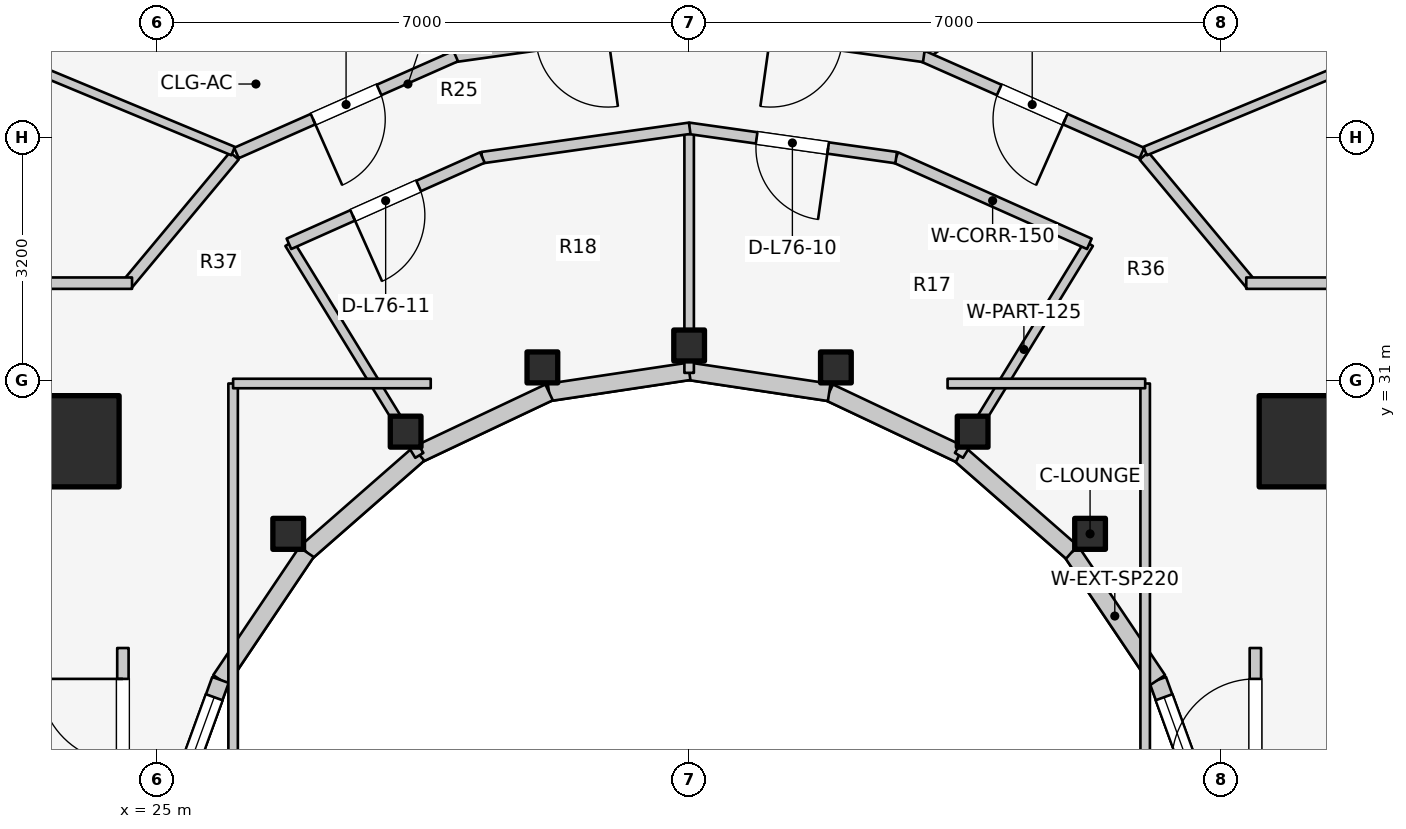
"""IFC4 building model, lengths in metres.
Left out: names, types, materials, properties, quantities, classifications, styles, units other than length and angle.
Written with IfcOpenShell. Run it as: python <this file> out.ifc"""

import sys

from ifc_helpers import new_model, si_unit, direction, frame, frame_2d, origin, origin_2d, place, context, subcontext, project, spatial, rectangle, i_section, extrude, element, fill, save


model = new_model("IFC4")
c1 = context("Model", 3, precision=1e-05, world=origin(), true_north=direction((0.0, 1.0)))
c2 = subcontext(c1, "Body", "Model", "MODEL_VIEW")
j1 = project(units=[si_unit("LENGTHUNIT", "METRE"), si_unit("PLANEANGLEUNIT", "RADIAN")], contexts=[c1])
p1 = place(None, origin())
s1 = spatial("IfcSite", under=j1, at=p1, CompositionType="ELEMENT")
p2 = place(p1, origin())
s2 = spatial("IfcBuilding", under=s1, at=p2, CompositionType="ELEMENT")
p3 = place(p2, frame((0.0, 0.0, 249.6)))
s3 = spatial("IfcBuildingStorey", under=s2, at=p3, CompositionType="ELEMENT", Elevation=249.6)
for number, where, z_axis, x_axis in (
    (1, (19.65, 30.35, 0.0), (0.0, 0.0, 1.0), (1.0, 0.0, 0.0)),
    (2, (39.85, 30.35, 0.0), (0.0, 0.0, 1.0), (1.0, 0.0, 0.0)),
):
    element("IfcWall", number, at=place(p3, frame(where, z_axis=z_axis, x_axis=x_axis)), inside=s3, PredefinedType="SHEAR", context=c2, shape_type="SweptSolid", body=[
        extrude(rectangle(XDim=4.5, YDim=0.45, at=frame_2d((2.25, 0.0))), origin(), (0.0, 0.0, 1.0), 3.6),
    ])
for number, where, z_axis, x_axis in (
    (3, (23.9, 30.2, 0.0), (0.0, 0.0, 1.0), (1.0, 0.0, 0.0)),
    (4, (40.1, 30.2, 0.0), (0.0, 0.0, 1.0), (1.0, 0.0, 0.0)),
):
    element("IfcColumn", number, at=place(p3, frame(where, z_axis=z_axis, x_axis=x_axis)), inside=s3, PredefinedType="COLUMN", context=c2, shape_type="SweptSolid", body=[
        extrude(rectangle(XDim=1.2, YDim=1.2, at=origin_2d()), origin(), (0.0, 0.0, 1.0), 3.6),
    ])
for number, where, z_axis, x_axis in (
    (5, (37.275, 28.982, 0.0), (0.0, 0.0, 1.0), (1.0, 0.0, 0.0)),
    (6, (35.73, 30.327, 0.0), (0.0, 0.0, 1.0), (1.0, 0.0, 0.0)),
    (7, (33.931, 31.172, 0.0), (0.0, 0.0, 1.0), (1.0, 0.0, 0.0)),
    (8, (32.0, 31.46, 0.0), (0.0, 0.0, 1.0), (1.0, 0.0, 0.0)),
    (9, (30.069, 31.172, 0.0), (0.0, 0.0, 1.0), (1.0, 0.0, 0.0)),
    (10, (28.27, 30.327, 0.0), (0.0, 0.0, 1.0), (1.0, 0.0, 0.0)),
    (11, (26.725, 28.982, 0.0), (0.0, 0.0, 1.0), (1.0, 0.0, 0.0)),
):
    element("IfcColumn", number, at=place(p3, frame(where, z_axis=z_axis, x_axis=x_axis)), inside=s3, PredefinedType="COLUMN", context=c2, shape_type="SweptSolid", body=[
        extrude(i_section(OverallWidth=0.404, OverallDepth=0.407, WebThickness=0.027, FlangeThickness=0.044, FilletRadius=0.025, at=origin_2d()), origin(), (0.0, 0.0, 1.0), 3.6),
    ])
p4 = place(p3, frame((38.877, 25.102, 0.0), z_axis=(0.0, 0.0, 1.0), x_axis=(-0.341423187295, 0.93990968033, 0.0)))
e12 = element("IfcWall", 12, at=p4, inside=s3, PredefinedType="STANDARD", context=c2, shape_type="SweptSolid", body=[
    extrude(rectangle(XDim=2.084, YDim=0.23, at=frame_2d((1.042, 0.0))), origin(), (0.0, 0.0, 1.0), 3.28),
])
p5 = place(p4, frame((0.242, 0.0, 0.85)))
e13 = element("IfcOpeningElement", 13, at=p5, cuts=e12, PredefinedType="OPENING", context=c2, shape_type="SweptSolid", body=[
    extrude(rectangle(XDim=1.6, YDim=1.65, at=frame_2d((0.8, 0.825))), frame((0.0, 0.125, 0.0), z_axis=(0.0, -1.0, 0.0), x_axis=(1.0, 0.0, 0.0)), (0.0, 0.0, 1.0), 0.25),
])
p6 = place(p3, frame((38.166, 27.06, 0.0), z_axis=(0.0, 0.0, 1.0), x_axis=(-0.558197800898, 0.829707909492, 0.0)))
e14 = element("IfcWall", 14, at=p6, inside=s3, PredefinedType="STANDARD", context=c2, shape_type="SweptSolid", body=[
    extrude(rectangle(XDim=2.027, YDim=0.23, at=frame_2d((1.013, 0.0))), origin(), (0.0, 0.0, 1.0), 2.6),
])
p7 = place(p3, frame((37.035, 28.742, 0.0), z_axis=(0.0, 0.0, 1.0), x_axis=(-0.752576694707, 0.658504607869, 0.0)))
e15 = element("IfcWall", 15, at=p7, inside=s3, PredefinedType="STANDARD", context=c2, shape_type="SweptSolid", body=[
    extrude(rectangle(XDim=1.959, YDim=0.23, at=frame_2d((0.98, 0.0))), origin(), (0.0, 0.0, 1.0), 2.6),
])
p8 = place(p3, frame((35.56, 30.032, 0.0), z_axis=(0.0, 0.0, 1.0), x_axis=(-0.904179699603, 0.427152280606, 0.0)))
e16 = element("IfcWall", 16, at=p8, inside=s3, PredefinedType="STANDARD", context=c2, shape_type="SweptSolid", body=[
    extrude(rectangle(XDim=1.899, YDim=0.23, at=frame_2d((0.95, 0.0))), origin(), (0.0, 0.0, 1.0), 2.6),
])
for number, where, z_axis, x_axis in (
    (17, (33.843, 30.843, 0.0), (0.0, 0.0, 1.0), (-0.989, 0.149, 0.0)),
    (18, (32.0, 31.12, 0.0), (0.0, 0.0, 1.0), (-0.989, -0.149, 0.0)),
):
    element("IfcWall", number, at=place(p3, frame(where, z_axis=z_axis, x_axis=x_axis)), inside=s3, PredefinedType="STANDARD", context=c2, shape_type="SweptSolid", body=[
        extrude(rectangle(XDim=1.864, YDim=0.23, at=frame_2d((0.932, 0.0))), origin(), (0.0, 0.0, 1.0), 2.6),
    ])
p9 = place(p3, frame((30.157, 30.843, 0.0), z_axis=(0.0, 0.0, 1.0), x_axis=(-0.904179699603, -0.427152280606, 0.0)))
e19 = element("IfcWall", 19, at=p9, inside=s3, PredefinedType="STANDARD", context=c2, shape_type="SweptSolid", body=[
    extrude(rectangle(XDim=1.899, YDim=0.23, at=frame_2d((0.95, 0.0))), origin(), (0.0, 0.0, 1.0), 2.6),
])
p10 = place(p3, frame((28.44, 30.032, 0.0), z_axis=(0.0, 0.0, 1.0), x_axis=(-0.752576694707, -0.658504607869, 0.0)))
e20 = element("IfcWall", 20, at=p10, inside=s3, PredefinedType="STANDARD", context=c2, shape_type="SweptSolid", body=[
    extrude(rectangle(XDim=1.959, YDim=0.23, at=frame_2d((0.98, 0.0))), origin(), (0.0, 0.0, 1.0), 2.6),
])
p11 = place(p3, frame((26.965, 28.742, 0.0), z_axis=(0.0, 0.0, 1.0), x_axis=(-0.558197800898, -0.829707909492, 0.0)))
e21 = element("IfcWall", 21, at=p11, inside=s3, PredefinedType="STANDARD", context=c2, shape_type="SweptSolid", body=[
    extrude(rectangle(XDim=2.027, YDim=0.23, at=frame_2d((1.013, 0.0))), origin(), (0.0, 0.0, 1.0), 2.6),
])
p12 = place(p3, frame((25.834, 27.06, 0.0), z_axis=(0.0, 0.0, 1.0), x_axis=(-0.341423187295, -0.93990968033, 0.0)))
e22 = element("IfcWall", 22, at=p12, inside=s3, PredefinedType="STANDARD", context=c2, shape_type="SweptSolid", body=[
    extrude(rectangle(XDim=2.084, YDim=0.23, at=frame_2d((1.042, 0.0))), origin(), (0.0, 0.0, 1.0), 3.28),
])
p13 = place(p12, frame((0.242, 0.0, 0.85)))
e23 = element("IfcOpeningElement", 23, at=p13, cuts=e22, PredefinedType="OPENING", context=c2, shape_type="SweptSolid", body=[
    extrude(rectangle(XDim=1.6, YDim=1.65, at=frame_2d((0.8, 0.825))), frame((0.0, 0.125, 0.0), z_axis=(0.0, -1.0, 0.0), x_axis=(1.0, 0.0, 0.0)), (0.0, 0.0, 1.0), 0.25),
])
p14 = place(p3, frame((24.55, 24.08, 0.0), z_axis=(0.0, 0.0, 1.0), x_axis=(0.0, 1.0, 0.0)))
e24 = element("IfcWall", 24, at=p14, inside=s3, PredefinedType="PARTITIONING", context=c2, shape_type="SweptSolid", body=[
    extrude(rectangle(XDim=3.4, YDim=0.15, at=frame_2d((1.7, 0.0))), origin(), (0.0, 0.0, 1.0), 3.295),
])
p15 = place(p14, frame((1.894, 0.0, 0.0)))
e25 = element("IfcOpeningElement", 25, at=p15, cuts=e24, PredefinedType="OPENING", context=c2, shape_type="SweptSolid", body=[
    extrude(rectangle(XDim=1.1, YDim=2.1, at=frame_2d((0.55, 1.05))), frame((0.0, 0.085, 0.0), z_axis=(0.0, -1.0, 0.0), x_axis=(1.0, 0.0, 0.0)), (0.0, 0.0, 1.0), 0.17),
])
p16 = place(p3, frame((39.45, 24.08, 0.0), z_axis=(0.0, 0.0, 1.0), x_axis=(0.0, 1.0, 0.0)))
e26 = element("IfcWall", 26, at=p16, inside=s3, PredefinedType="PARTITIONING", context=c2, shape_type="SweptSolid", body=[
    extrude(rectangle(XDim=3.4, YDim=0.15, at=frame_2d((1.7, 0.0))), origin(), (0.0, 0.0, 1.0), 3.295),
])
p17 = place(p16, frame((1.894, 0.0, 0.0)))
e27 = element("IfcOpeningElement", 27, at=p17, cuts=e26, PredefinedType="OPENING", context=c2, shape_type="SweptSolid", body=[
    extrude(rectangle(XDim=1.1, YDim=2.1, at=frame_2d((0.55, 1.05))), frame((0.0, 0.085, 0.0), z_axis=(0.0, -1.0, 0.0), x_axis=(1.0, 0.0, 0.0)), (0.0, 0.0, 1.0), 0.17),
])
p18 = place(p3, frame((35.55, 30.015, 0.0), z_axis=(0.0, 0.0, 1.0), x_axis=(0.522763432117, 0.852477796802, 0.0)))
e28 = element("IfcWall", 28, at=p18, inside=s3, PredefinedType="PARTITIONING", context=c2, shape_type="SweptSolid", body=[
    extrude(rectangle(XDim=3.269, YDim=0.125, at=frame_2d((1.635, 0.0))), origin(), (0.0, 0.0, 1.0), 2.672),
])
p19 = place(p3, frame((32.0, 31.1, 0.0), z_axis=(0.0, 0.0, 1.0), x_axis=(0.0, 1.0, 0.0)))
e29 = element("IfcWall", 29, at=p19, inside=s3, PredefinedType="PARTITIONING", context=c2, shape_type="SweptSolid", body=[
    extrude(rectangle(XDim=3.218, YDim=0.125, at=frame_2d((1.609, 0.0))), origin(), (0.0, 0.0, 1.0), 2.672),
])
p20 = place(p3, frame((28.45, 30.015, 0.0), z_axis=(0.0, 0.0, 1.0), x_axis=(-0.522763432117, 0.852477796802, 0.0)))
e30 = element("IfcWall", 30, at=p20, inside=s3, PredefinedType="PARTITIONING", context=c2, shape_type="SweptSolid", body=[
    extrude(rectangle(XDim=3.269, YDim=0.125, at=frame_2d((1.635, 0.0))), origin(), (0.0, 0.0, 1.0), 2.672),
])
p21 = place(p3, frame((37.265, 32.798, 0.0), z_axis=(0.0, 0.0, 1.0), x_axis=(-0.913254317828, 0.407389924971, 0.0)))
e31 = element("IfcWall", 31, at=p21, inside=s3, PredefinedType="PARTITIONING", context=c2, shape_type="SweptSolid", body=[
    extrude(rectangle(XDim=2.787, YDim=0.15, at=frame_2d((1.393, 0.0))), origin(), (0.0, 0.0, 1.0), 2.823),
])
p22 = place(p3, frame((34.724, 33.932, 0.0), z_axis=(0.0, 0.0, 1.0), x_axis=(-0.990150268487, 0.140008734782, 0.0)))
e32 = element("IfcWall", 32, at=p22, inside=s3, PredefinedType="PARTITIONING", context=c2, shape_type="SweptSolid", body=[
    extrude(rectangle(XDim=2.759, YDim=0.15, at=frame_2d((1.379, 0.0))), origin(), (0.0, 0.0, 1.0), 2.823),
])
p23 = place(p22, frame((0.904, 0.0, 0.0)))
e33 = element("IfcOpeningElement", 33, at=p23, cuts=e32, PredefinedType="OPENING", context=c2, shape_type="SweptSolid", body=[
    extrude(rectangle(XDim=0.95, YDim=2.1, at=frame_2d((0.475, 1.05))), frame((0.0, 0.085, 0.0), z_axis=(0.0, -1.0, 0.0), x_axis=(1.0, 0.0, 0.0)), (0.0, 0.0, 1.0), 0.17),
])
p24 = place(p3, frame((32.007, 34.318, 0.0), z_axis=(0.0, 0.0, 1.0), x_axis=(-0.990150268487, -0.140008734782, 0.0)))
e34 = element("IfcWall", 34, at=p24, inside=s3, PredefinedType="PARTITIONING", context=c2, shape_type="SweptSolid", body=[
    extrude(rectangle(XDim=2.759, YDim=0.15, at=frame_2d((1.379, 0.0))), origin(), (0.0, 0.0, 1.0), 2.823),
])
p25 = place(p3, frame((29.28, 33.933, 0.0), z_axis=(0.0, 0.0, 1.0), x_axis=(-0.913254317828, -0.407389924971, 0.0)))
e35 = element("IfcWall", 35, at=p25, inside=s3, PredefinedType="PARTITIONING", context=c2, shape_type="SweptSolid", body=[
    extrude(rectangle(XDim=2.787, YDim=0.15, at=frame_2d((1.393, 0.0))), origin(), (0.0, 0.0, 1.0), 2.823),
])
p26 = place(p25, frame((0.918, 0.0, 0.0)))
e36 = element("IfcOpeningElement", 36, at=p26, cuts=e35, PredefinedType="OPENING", context=c2, shape_type="SweptSolid", body=[
    extrude(rectangle(XDim=0.95, YDim=2.1, at=frame_2d((0.475, 1.05))), frame((0.0, 0.085, 0.0), z_axis=(0.0, -1.0, 0.0), x_axis=(1.0, 0.0, 0.0)), (0.0, 0.0, 1.0), 0.17),
])
p27 = place(p3, frame((26.0, 25.8, 0.0), z_axis=(0.0, 0.0, 1.0), x_axis=(0.0, 1.0, 0.0)))
e37 = element("IfcWall", 37, at=p27, inside=s3, PredefinedType="PARTITIONING", context=c2, shape_type="SweptSolid", body=[
    extrude(rectangle(XDim=5.16, YDim=0.125, at=frame_2d((2.58, 0.0))), origin(), (0.0, 0.0, 1.0), 2.672),
])
p28 = place(p3, frame((26.0, 30.96, 0.0), z_axis=(0.0, 0.0, 1.0), x_axis=(1.0, 0.0, 0.0)))
e38 = element("IfcWall", 38, at=p28, inside=s3, PredefinedType="PARTITIONING", context=c2, shape_type="SweptSolid", body=[
    extrude(rectangle(XDim=2.6, YDim=0.125, at=frame_2d((1.3, 0.0))), origin(), (0.0, 0.0, 1.0), 2.816),
])
p29 = place(p3, frame((38.0, 25.8, 0.0), z_axis=(0.0, 0.0, 1.0), x_axis=(0.0, 1.0, 0.0)))
e39 = element("IfcWall", 39, at=p29, inside=s3, PredefinedType="PARTITIONING", context=c2, shape_type="SweptSolid", body=[
    extrude(rectangle(XDim=5.16, YDim=0.125, at=frame_2d((2.58, 0.0))), origin(), (0.0, 0.0, 1.0), 2.672),
])
p30 = place(p3, frame((35.4, 30.96, 0.0), z_axis=(0.0, 0.0, 1.0), x_axis=(1.0, 0.0, 0.0)))
e40 = element("IfcWall", 40, at=p30, inside=s3, PredefinedType="PARTITIONING", context=c2, shape_type="SweptSolid", body=[
    extrude(rectangle(XDim=2.6, YDim=0.125, at=frame_2d((1.3, 0.0))), origin(), (0.0, 0.0, 1.0), 2.816),
])
p31 = place(p3, frame((37.984, 33.955, 0.0), z_axis=(0.0, 0.0, 1.0), x_axis=(0.64030392053, -0.76812166312, 0.0)))
e41 = element("IfcWall", 41, at=p31, inside=s3, PredefinedType="PARTITIONING", context=c2, shape_type="SweptSolid", body=[
    extrude(rectangle(XDim=2.21, YDim=0.15, at=frame_2d((1.105, 0.0))), origin(), (0.0, 0.0, 1.0), 2.816),
])
p32 = place(p3, frame((39.33, 32.28, 0.0), z_axis=(0.0, 0.0, 1.0), x_axis=(1.0, 0.0, 0.0)))
e42 = element("IfcWall", 42, at=p32, inside=s3, PredefinedType="PARTITIONING", context=c2, shape_type="SweptSolid", body=[
    extrude(rectangle(XDim=7.52, YDim=0.15, at=frame_2d((3.76, 0.0))), origin(), (0.0, 0.0, 1.0), 2.816),
])
p33 = place(p32, frame((5.22, 0.0, 0.0)))
e43 = element("IfcOpeningElement", 43, at=p33, cuts=e42, PredefinedType="OPENING", context=c2, shape_type="SweptSolid", body=[
    extrude(rectangle(XDim=0.9, YDim=2.1, at=frame_2d((0.45, 1.05))), frame((0.0, 0.085, 0.0), z_axis=(0.0, -1.0, 0.0), x_axis=(1.0, 0.0, 0.0)), (0.0, 0.0, 1.0), 0.17),
])
p34 = place(p3, frame((26.016, 33.955, 0.0), z_axis=(0.0, 0.0, 1.0), x_axis=(-0.64030392053, -0.76812166312, 0.0)))
e44 = element("IfcWall", 44, at=p34, inside=s3, PredefinedType="PARTITIONING", context=c2, shape_type="SweptSolid", body=[
    extrude(rectangle(XDim=2.21, YDim=0.15, at=frame_2d((1.105, 0.0))), origin(), (0.0, 0.0, 1.0), 2.816),
])
p35 = place(p3, frame((17.15, 32.28, 0.0), z_axis=(0.0, 0.0, 1.0), x_axis=(1.0, 0.0, 0.0)))
e45 = element("IfcWall", 45, at=p35, inside=s3, PredefinedType="PARTITIONING", context=c2, shape_type="SweptSolid", body=[
    extrude(rectangle(XDim=7.52, YDim=0.15, at=frame_2d((3.76, 0.0))), origin(), (0.0, 0.0, 1.0), 2.816),
])
p36 = place(p35, frame((1.3, 0.0, 0.0)))
e46 = element("IfcOpeningElement", 46, at=p36, cuts=e45, PredefinedType="OPENING", context=c2, shape_type="SweptSolid", body=[
    extrude(rectangle(XDim=0.9, YDim=2.1, at=frame_2d((0.45, 1.05))), frame((0.0, 0.085, 0.0), z_axis=(0.0, -1.0, 0.0), x_axis=(1.0, 0.0, 0.0)), (0.0, 0.0, 1.0), 0.17),
])
p37 = place(p3, frame((38.0, 34.018, 0.0), z_axis=(0.0, 0.0, 1.0), x_axis=(0.92349333748, 0.383614462228, 0.0)))
e47 = element("IfcWall", 47, at=p37, inside=s3, PredefinedType="MOVABLE", context=c2, shape_type="SweptSolid", body=[
    extrude(rectangle(XDim=5.907, YDim=0.12, at=frame_2d((2.954, 0.0))), origin(), (0.0, 0.0, 1.0), 2.66),
])
for number, where, z_axis, x_axis in (
    (48, (35.124, 35.297, 0.0), (0.0, 0.0, 1.0), (0.812, 0.584, 0.0)),
    (49, (28.876, 35.297, 0.0), (0.0, 0.0, 1.0), (-0.812, 0.584, 0.0)),
):
    element("IfcWall", number, at=place(p3, frame(where, z_axis=z_axis, x_axis=x_axis)), inside=s3, PredefinedType="MOVABLE", context=c2, shape_type="SweptSolid", body=[
        extrude(rectangle(XDim=4.534, YDim=0.12, at=frame_2d((2.267, 0.0))), origin(), (0.0, 0.0, 1.0), 2.66),
    ])
p38 = place(p3, frame((26.0, 34.018, 0.0), z_axis=(0.0, 0.0, 1.0), x_axis=(-0.92349333748, 0.383614462228, 0.0)))
e50 = element("IfcWall", 50, at=p38, inside=s3, PredefinedType="MOVABLE", context=c2, shape_type="SweptSolid", body=[
    extrude(rectangle(XDim=5.907, YDim=0.12, at=frame_2d((2.954, 0.0))), origin(), (0.0, 0.0, 1.0), 2.66),
])
p39 = place(p3, frame((37.956, 33.992, 0.0), z_axis=(0.0, 0.0, 1.0), x_axis=(-0.914642679993, 0.404263240891, 0.0)))
e51 = element("IfcWall", 51, at=p39, inside=s3, PredefinedType="PARTITIONING", context=c2, shape_type="SweptSolid", body=[
    extrude(rectangle(XDim=3.154, YDim=0.15, at=frame_2d((1.577, 0.0))), origin(), (0.0, 0.0, 1.0), 2.823),
])
p40 = place(p39, frame((1.102, 0.0, 0.0)))
e52 = element("IfcOpeningElement", 52, at=p40, cuts=e51, PredefinedType="OPENING", context=c2, shape_type="SweptSolid", body=[
    extrude(rectangle(XDim=0.95, YDim=2.1, at=frame_2d((0.475, 1.05))), frame((0.0, 0.085, 0.0), z_axis=(0.0, -1.0, 0.0), x_axis=(1.0, 0.0, 0.0)), (0.0, 0.0, 1.0), 0.17),
])
p41 = place(p3, frame((35.087, 35.263, 0.0), z_axis=(0.0, 0.0, 1.0), x_axis=(-0.990268690673, 0.139168675614, 0.0)))
e53 = element("IfcWall", 53, at=p41, inside=s3, PredefinedType="PARTITIONING", context=c2, shape_type="SweptSolid", body=[
    extrude(rectangle(XDim=3.126, YDim=0.15, at=frame_2d((1.563, 0.0))), origin(), (0.0, 0.0, 1.0), 2.823),
])
p42 = place(p41, frame((1.088, 0.0, 0.0)))
e54 = element("IfcOpeningElement", 54, at=p42, cuts=e53, PredefinedType="OPENING", context=c2, shape_type="SweptSolid", body=[
    extrude(rectangle(XDim=0.95, YDim=2.1, at=frame_2d((0.475, 1.05))), frame((0.0, 0.085, 0.0), z_axis=(0.0, -1.0, 0.0), x_axis=(1.0, 0.0, 0.0)), (0.0, 0.0, 1.0), 0.17),
])
p43 = place(p3, frame((32.008, 35.698, 0.0), z_axis=(0.0, 0.0, 1.0), x_axis=(-0.990268690673, -0.139168675614, 0.0)))
e55 = element("IfcWall", 55, at=p43, inside=s3, PredefinedType="PARTITIONING", context=c2, shape_type="SweptSolid", body=[
    extrude(rectangle(XDim=3.126, YDim=0.15, at=frame_2d((1.563, 0.0))), origin(), (0.0, 0.0, 1.0), 2.823),
])
p44 = place(p43, frame((1.088, 0.0, 0.0)))
e56 = element("IfcOpeningElement", 56, at=p44, cuts=e55, PredefinedType="OPENING", context=c2, shape_type="SweptSolid", body=[
    extrude(rectangle(XDim=0.95, YDim=2.1, at=frame_2d((0.475, 1.05))), frame((0.0, 0.085, 0.0), z_axis=(0.0, -1.0, 0.0), x_axis=(1.0, 0.0, 0.0)), (0.0, 0.0, 1.0), 0.17),
])
p45 = place(p3, frame((28.929, 35.268, 0.0), z_axis=(0.0, 0.0, 1.0), x_axis=(-0.914642679993, -0.404263240891, 0.0)))
e57 = element("IfcWall", 57, at=p45, inside=s3, PredefinedType="PARTITIONING", context=c2, shape_type="SweptSolid", body=[
    extrude(rectangle(XDim=3.154, YDim=0.15, at=frame_2d((1.577, 0.0))), origin(), (0.0, 0.0, 1.0), 2.823),
])
p46 = place(p45, frame((1.102, 0.0, 0.0)))
e58 = element("IfcOpeningElement", 58, at=p46, cuts=e57, PredefinedType="OPENING", context=c2, shape_type="SweptSolid", body=[
    extrude(rectangle(XDim=0.95, YDim=2.1, at=frame_2d((0.475, 1.05))), frame((0.0, 0.085, 0.0), z_axis=(0.0, -1.0, 0.0), x_axis=(1.0, 0.0, 0.0)), (0.0, 0.0, 1.0), 0.17),
])
p47 = place(p5, origin())
e59 = element("IfcWindow", 59, at=p47, inside=s3, PartitioningType="SINGLE_PANEL", PredefinedType="WINDOW", context=c2, shape_type="SweptSolid", body=[
    extrude(rectangle(XDim=1.6, YDim=1.65, at=frame_2d((0.8, 0.825))), frame((0.0, 0.03, 0.0), z_axis=(0.0, -1.0, 0.0), x_axis=(1.0, 0.0, 0.0)), (0.0, 0.0, 1.0), 0.06),
])
fill(e13, e59)
p48 = place(p13, origin())
e60 = element("IfcWindow", 60, at=p48, inside=s3, PartitioningType="SINGLE_PANEL", PredefinedType="WINDOW", context=c2, shape_type="SweptSolid", body=[
    extrude(rectangle(XDim=1.6, YDim=1.65, at=frame_2d((0.8, 0.825))), frame((0.0, 0.03, 0.0), z_axis=(0.0, -1.0, 0.0), x_axis=(1.0, 0.0, 0.0)), (0.0, 0.0, 1.0), 0.06),
])
fill(e23, e60)
p49 = place(p15, origin())
e61 = element("IfcDoor", 61, at=p49, inside=s3, OperationType="SINGLE_SWING_RIGHT", PredefinedType="DOOR", context=c2, shape_type="SweptSolid", body=[
    extrude(rectangle(XDim=1.1, YDim=2.1, at=frame_2d((0.55, 1.05))), frame((0.0, 0.025, 0.0), z_axis=(0.0, -1.0, 0.0), x_axis=(1.0, 0.0, 0.0)), (0.0, 0.0, 1.0), 0.05),
])
fill(e25, e61)
p50 = place(p17, origin())
e62 = element("IfcDoor", 62, at=p50, inside=s3, OperationType="SINGLE_SWING_LEFT", PredefinedType="DOOR", context=c2, shape_type="SweptSolid", body=[
    extrude(rectangle(XDim=1.1, YDim=2.1, at=frame_2d((0.55, 1.05))), frame((0.0, 0.025, 0.0), z_axis=(0.0, -1.0, 0.0), x_axis=(1.0, 0.0, 0.0)), (0.0, 0.0, 1.0), 0.05),
])
fill(e27, e62)
p51 = place(p23, origin())
e63 = element("IfcDoor", 63, at=p51, inside=s3, OperationType="SINGLE_SWING_LEFT", PredefinedType="DOOR", context=c2, shape_type="SweptSolid", body=[
    extrude(rectangle(XDim=0.95, YDim=2.1, at=frame_2d((0.475, 1.05))), frame((0.0, 0.025, 0.0), z_axis=(0.0, -1.0, 0.0), x_axis=(1.0, 0.0, 0.0)), (0.0, 0.0, 1.0), 0.05),
])
fill(e33, e63)
p52 = place(p26, origin())
e64 = element("IfcDoor", 64, at=p52, inside=s3, OperationType="SINGLE_SWING_RIGHT", PredefinedType="DOOR", context=c2, shape_type="SweptSolid", body=[
    extrude(rectangle(XDim=0.95, YDim=2.1, at=frame_2d((0.475, 1.05))), frame((0.0, 0.025, 0.0), z_axis=(0.0, -1.0, 0.0), x_axis=(1.0, 0.0, 0.0)), (0.0, 0.0, 1.0), 0.05),
])
fill(e36, e64)
p53 = place(p40, origin())
e65 = element("IfcDoor", 65, at=p53, inside=s3, OperationType="SINGLE_SWING_LEFT", PredefinedType="DOOR", context=c2, shape_type="SweptSolid", body=[
    extrude(rectangle(XDim=0.95, YDim=2.1, at=frame_2d((0.475, 1.05))), frame((0.0, 0.025, 0.0), z_axis=(0.0, -1.0, 0.0), x_axis=(1.0, 0.0, 0.0)), (0.0, 0.0, 1.0), 0.05),
])
fill(e52, e65)
p54 = place(p46, origin())
e66 = element("IfcDoor", 66, at=p54, inside=s3, OperationType="SINGLE_SWING_RIGHT", PredefinedType="DOOR", context=c2, shape_type="SweptSolid", body=[
    extrude(rectangle(XDim=0.95, YDim=2.1, at=frame_2d((0.475, 1.05))), frame((0.0, 0.025, 0.0), z_axis=(0.0, -1.0, 0.0), x_axis=(1.0, 0.0, 0.0)), (0.0, 0.0, 1.0), 0.05),
])
fill(e58, e66)
save(model, sys.argv[1])
